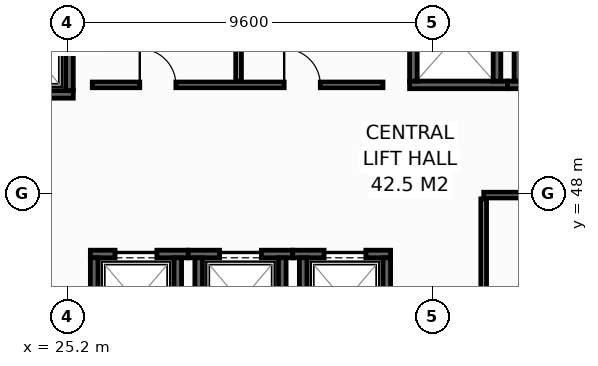
"""IFC4 building model, lengths in metres.
Left out: names, types, materials, properties, quantities, classifications, styles, units other than length and angle.
Written with IfcOpenShell. Run it as: python <this file> out.ifc"""

import sys

from ifc_helpers import new_model, si_unit, direction, frame, frame_2d, origin, place, context, subcontext, project, spatial, rectangle, extrude, element, fill, save


model = new_model("IFC4")
c1 = context("Model", 3, precision=1e-05, world=origin(), true_north=direction((0.0, 1.0)))
c2 = subcontext(c1, "Body", "Model", "MODEL_VIEW")
j1 = project(units=[si_unit("LENGTHUNIT", "METRE"), si_unit("PLANEANGLEUNIT", "RADIAN")], contexts=[c1])
p1 = place(None, origin())
s1 = spatial("IfcSite", under=j1, at=p1, CompositionType="ELEMENT")
p2 = place(p1, origin())
s2 = spatial("IfcBuilding", under=s1, at=p2, CompositionType="ELEMENT")
p3 = place(p2, frame((0.0, 0.0, 198.0)))
s3 = spatial("IfcBuildingStorey", under=s2, at=p3, CompositionType="ELEMENT", Elevation=198.0)
p4 = place(p3, frame((22.5, 50.6, 0.0), z_axis=(0.0, 0.0, 1.0), x_axis=(1.0, 0.0, 0.0)))
e1 = element("IfcWall", 1, at=p4, inside=s3, PredefinedType="SHEAR", context=c2, shape_type="SweptSolid", body=[
    extrude(rectangle(XDim=2.85, YDim=0.2, at=frame_2d((1.425, 0.0))), origin(), (0.0, 0.0, 1.0), 3.55),
])
p5 = place(p4, frame((0.925, 0.0, 0.0)))
e2 = element("IfcOpeningElement", 2, at=p5, cuts=e1, PredefinedType="OPENING", context=c2, shape_type="SweptSolid", body=[
    extrude(rectangle(XDim=1.25, YDim=2.3, at=frame_2d((0.625, 1.15))), frame((0.0, 0.11, 0.0), z_axis=(0.0, -1.0, 0.0), x_axis=(1.0, 0.0, 0.0)), (0.0, 0.0, 1.0), 0.22),
])
p6 = place(p3, frame((25.25, 50.7, 0.0), z_axis=(0.0, 0.0, 1.0), x_axis=(0.0, 1.0, 0.0)))
e3 = element("IfcWall", 3, at=p6, inside=s3, PredefinedType="SHEAR", context=c2, shape_type="SweptSolid", body=[
    extrude(rectangle(XDim=2.6, YDim=0.2, at=frame_2d((1.3, 0.0))), origin(), (0.0, 0.0, 1.0), 3.55),
])
p7 = place(p3, frame((25.8, 46.4, 0.0), z_axis=(0.0, 0.0, 1.0), x_axis=(1.0, 0.0, 0.0)))
e4 = element("IfcWall", 4, at=p7, inside=s3, PredefinedType="SHEAR", context=c2, shape_type="SweptSolid", body=[
    extrude(rectangle(XDim=2.575, YDim=0.2, at=frame_2d((1.288, 0.0))), origin(), (0.0, 0.0, 1.0), 3.55),
])
p8 = place(p7, frame((0.65, 0.0, 0.0)))
e5 = element("IfcOpeningElement", 5, at=p8, cuts=e4, PredefinedType="OPENING", context=c2, shape_type="SweptSolid", body=[
    extrude(rectangle(XDim=1.1, YDim=2.2, at=frame_2d((0.55, 1.1))), frame((0.0, 0.11, 0.0), z_axis=(0.0, -1.0, 0.0), x_axis=(1.0, 0.0, 0.0)), (0.0, 0.0, 1.0), 0.22),
])
for number, where, z_axis, x_axis in (
    (6, (25.9, 44.0, 0.0), (0.0, 0.0, 1.0), (0.0, 1.0, 0.0)),
    (7, (28.1, 44.0, 0.0), (0.0, 0.0, 1.0), (0.0, 1.0, 0.0)),
):
    element("IfcWall", number, at=place(p3, frame(where, z_axis=z_axis, x_axis=x_axis)), inside=s3, PredefinedType="SHEAR", context=c2, shape_type="SweptSolid", body=[
        extrude(rectangle(XDim=2.3, YDim=0.2, at=frame_2d((1.15, 0.0))), origin(), (0.0, 0.0, 1.0), 3.55),
    ])
p9 = place(p3, frame((28.375, 46.4, 0.0), z_axis=(0.0, 0.0, 1.0), x_axis=(1.0, 0.0, 0.0)))
e8 = element("IfcWall", 8, at=p9, inside=s3, PredefinedType="SHEAR", context=c2, shape_type="SweptSolid", body=[
    extrude(rectangle(XDim=2.75, YDim=0.2, at=frame_2d((1.375, 0.0))), origin(), (0.0, 0.0, 1.0), 3.55),
])
p10 = place(p9, frame((0.825, 0.0, 0.0)))
e9 = element("IfcOpeningElement", 9, at=p10, cuts=e8, PredefinedType="OPENING", context=c2, shape_type="SweptSolid", body=[
    extrude(rectangle(XDim=1.1, YDim=2.2, at=frame_2d((0.55, 1.1))), frame((0.0, 0.11, 0.0), z_axis=(0.0, -1.0, 0.0), x_axis=(1.0, 0.0, 0.0)), (0.0, 0.0, 1.0), 0.22),
])
for number, where, z_axis, x_axis in (
    (10, (28.65, 44.0, 0.0), (0.0, 0.0, 1.0), (0.0, 1.0, 0.0)),
    (11, (30.85, 44.0, 0.0), (0.0, 0.0, 1.0), (0.0, 1.0, 0.0)),
):
    element("IfcWall", number, at=place(p3, frame(where, z_axis=z_axis, x_axis=x_axis)), inside=s3, PredefinedType="SHEAR", context=c2, shape_type="SweptSolid", body=[
        extrude(rectangle(XDim=2.3, YDim=0.2, at=frame_2d((1.15, 0.0))), origin(), (0.0, 0.0, 1.0), 3.55),
    ])
p11 = place(p3, frame((31.125, 46.4, 0.0), z_axis=(0.0, 0.0, 1.0), x_axis=(1.0, 0.0, 0.0)))
e12 = element("IfcWall", 12, at=p11, inside=s3, PredefinedType="SHEAR", context=c2, shape_type="SweptSolid", body=[
    extrude(rectangle(XDim=2.575, YDim=0.2, at=frame_2d((1.288, 0.0))), origin(), (0.0, 0.0, 1.0), 3.55),
])
p12 = place(p11, frame((0.825, 0.0, 0.0)))
e13 = element("IfcOpeningElement", 13, at=p12, cuts=e12, PredefinedType="OPENING", context=c2, shape_type="SweptSolid", body=[
    extrude(rectangle(XDim=1.1, YDim=2.2, at=frame_2d((0.55, 1.1))), frame((0.0, 0.11, 0.0), z_axis=(0.0, -1.0, 0.0), x_axis=(1.0, 0.0, 0.0)), (0.0, 0.0, 1.0), 0.22),
])
for number, where, z_axis, x_axis in (
    (14, (31.4, 44.0, 0.0), (0.0, 0.0, 1.0), (0.0, 1.0, 0.0)),
    (15, (33.6, 44.0, 0.0), (0.0, 0.0, 1.0), (0.0, 1.0, 0.0)),
):
    element("IfcWall", number, at=place(p3, frame(where, z_axis=z_axis, x_axis=x_axis)), inside=s3, PredefinedType="SHEAR", context=c2, shape_type="SweptSolid", body=[
        extrude(rectangle(XDim=2.3, YDim=0.2, at=frame_2d((1.15, 0.0))), origin(), (0.0, 0.0, 1.0), 3.55),
    ])
p13 = place(p3, frame((34.2, 50.85, 0.0), z_axis=(0.0, 0.0, 1.0), x_axis=(1.0, 0.0, 0.0)))
e16 = element("IfcWall", 16, at=p13, inside=s3, PredefinedType="SHEAR", context=c2, shape_type="SweptSolid", body=[
    extrude(rectangle(XDim=2.575, YDim=0.2, at=frame_2d((1.288, 0.0))), origin(), (0.0, 0.0, 1.0), 3.55),
])
for number, where, z_axis, x_axis in (
    (17, (34.3, 50.95, 0.0), (0.0, 0.0, 1.0), (0.0, 1.0, 0.0)),
    (18, (36.5, 50.95, 0.0), (0.0, 0.0, 1.0), (0.0, 1.0, 0.0)),
):
    element("IfcWall", number, at=place(p3, frame(where, z_axis=z_axis, x_axis=x_axis)), inside=s3, PredefinedType="SHEAR", context=c2, shape_type="SweptSolid", body=[
        extrude(rectangle(XDim=2.3, YDim=0.2, at=frame_2d((1.15, 0.0))), origin(), (0.0, 0.0, 1.0), 3.55),
    ])
p14 = place(p3, frame((36.775, 50.85, 0.0), z_axis=(0.0, 0.0, 1.0), x_axis=(1.0, 0.0, 0.0)))
e19 = element("IfcWall", 19, at=p14, inside=s3, PredefinedType="SHEAR", context=c2, shape_type="SweptSolid", body=[
    extrude(rectangle(XDim=2.75, YDim=0.2, at=frame_2d((1.375, 0.0))), origin(), (0.0, 0.0, 1.0), 3.55),
])
p15 = place(p3, frame((37.05, 50.95, 0.0), z_axis=(0.0, 0.0, 1.0), x_axis=(0.0, 1.0, 0.0)))
e20 = element("IfcWall", 20, at=p15, inside=s3, PredefinedType="SHEAR", context=c2, shape_type="SweptSolid", body=[
    extrude(rectangle(XDim=2.3, YDim=0.2, at=frame_2d((1.15, 0.0))), origin(), (0.0, 0.0, 1.0), 3.55),
])
p16 = place(p3, frame((36.15, 47.95, 0.0), z_axis=(0.0, 0.0, 1.0), x_axis=(1.0, 0.0, 0.0)))
e21 = element("IfcWall", 21, at=p16, inside=s3, PredefinedType="PARTITIONING", context=c2, shape_type="SweptSolid", body=[
    extrude(rectangle(XDim=6.35, YDim=0.15, at=frame_2d((3.175, 0.0))), origin(), (0.0, 0.0, 1.0), 3.55),
])
p17 = place(p3, frame((36.15, 45.22, 0.0), z_axis=(0.0, 0.0, 1.0), x_axis=(0.0, 1.0, 0.0)))
e22 = element("IfcWall", 22, at=p17, inside=s3, PredefinedType="PARTITIONING", context=c2, shape_type="SweptSolid", body=[
    extrude(rectangle(XDim=2.63, YDim=0.15, at=frame_2d((1.315, 0.0))), origin(), (0.0, 0.0, 1.0), 3.55),
])
p18 = place(p3, frame((25.85, 50.85, 0.0), z_axis=(0.0, 0.0, 1.0), x_axis=(1.0, 0.0, 0.0)))
e23 = element("IfcWall", 23, at=p18, inside=s3, PredefinedType="PARTITIONING", context=c2, shape_type="SweptSolid", body=[
    extrude(rectangle(XDim=7.65, YDim=0.15, at=frame_2d((3.825, 0.0))), origin(), (0.0, 0.0, 1.0), 3.55),
])
p19 = place(p18, frame((1.25, 0.0, 0.0)))
e24 = element("IfcOpeningElement", 24, at=p19, cuts=e23, PredefinedType="OPENING", context=c2, shape_type="SweptSolid", body=[
    extrude(rectangle(XDim=0.95, YDim=2.15, at=frame_2d((0.475, 1.075))), frame((0.0, 0.085, 0.0), z_axis=(0.0, -1.0, 0.0), x_axis=(1.0, 0.0, 0.0)), (0.0, 0.0, 1.0), 0.17),
])
p20 = place(p18, frame((5.05, 0.0, 0.0)))
e25 = element("IfcOpeningElement", 25, at=p20, cuts=e23, PredefinedType="OPENING", context=c2, shape_type="SweptSolid", body=[
    extrude(rectangle(XDim=0.95, YDim=2.15, at=frame_2d((0.475, 1.075))), frame((0.0, 0.085, 0.0), z_axis=(0.0, -1.0, 0.0), x_axis=(1.0, 0.0, 0.0)), (0.0, 0.0, 1.0), 0.17),
])
p21 = place(p3, frame((29.7, 50.95, 0.0), z_axis=(0.0, 0.0, 1.0), x_axis=(0.0, 1.0, 0.0)))
e26 = element("IfcWall", 26, at=p21, inside=s3, PredefinedType="PARTITIONING", context=c2, shape_type="SweptSolid", body=[
    extrude(rectangle(XDim=2.7, YDim=0.15, at=frame_2d((1.35, 0.0))), origin(), (0.0, 0.0, 1.0), 3.55),
])
p22 = place(p8, origin())
e27 = element("IfcDoor", 27, at=p22, inside=s3, OperationType="SLIDING_TO_LEFT", PredefinedType="DOOR", context=c2, shape_type="SweptSolid", body=[
    extrude(rectangle(XDim=1.1, YDim=2.2, at=frame_2d((0.55, 1.1))), frame((0.0, 0.025, 0.0), z_axis=(0.0, -1.0, 0.0), x_axis=(1.0, 0.0, 0.0)), (0.0, 0.0, 1.0), 0.05),
])
fill(e5, e27)
p23 = place(p10, origin())
e28 = element("IfcDoor", 28, at=p23, inside=s3, OperationType="SLIDING_TO_LEFT", PredefinedType="DOOR", context=c2, shape_type="SweptSolid", body=[
    extrude(rectangle(XDim=1.1, YDim=2.2, at=frame_2d((0.55, 1.1))), frame((0.0, 0.025, 0.0), z_axis=(0.0, -1.0, 0.0), x_axis=(1.0, 0.0, 0.0)), (0.0, 0.0, 1.0), 0.05),
])
fill(e9, e28)
p24 = place(p12, origin())
e29 = element("IfcDoor", 29, at=p24, inside=s3, OperationType="SLIDING_TO_LEFT", PredefinedType="DOOR", context=c2, shape_type="SweptSolid", body=[
    extrude(rectangle(XDim=1.1, YDim=2.2, at=frame_2d((0.55, 1.1))), frame((0.0, 0.025, 0.0), z_axis=(0.0, -1.0, 0.0), x_axis=(1.0, 0.0, 0.0)), (0.0, 0.0, 1.0), 0.05),
])
fill(e13, e29)
p25 = place(p19, origin())
e30 = element("IfcDoor", 30, at=p25, inside=s3, OperationType="SINGLE_SWING_LEFT", PredefinedType="DOOR", context=c2, shape_type="SweptSolid", body=[
    extrude(rectangle(XDim=0.95, YDim=2.15, at=frame_2d((0.475, 1.075))), frame((0.0, 0.025, 0.0), z_axis=(0.0, -1.0, 0.0), x_axis=(1.0, 0.0, 0.0)), (0.0, 0.0, 1.0), 0.05),
])
fill(e24, e30)
p26 = place(p20, origin())
e31 = element("IfcDoor", 31, at=p26, inside=s3, OperationType="SINGLE_SWING_LEFT", PredefinedType="DOOR", context=c2, shape_type="SweptSolid", body=[
    extrude(rectangle(XDim=0.95, YDim=2.15, at=frame_2d((0.475, 1.075))), frame((0.0, 0.025, 0.0), z_axis=(0.0, -1.0, 0.0), x_axis=(1.0, 0.0, 0.0)), (0.0, 0.0, 1.0), 0.05),
])
fill(e25, e31)
save(model, sys.argv[1])
